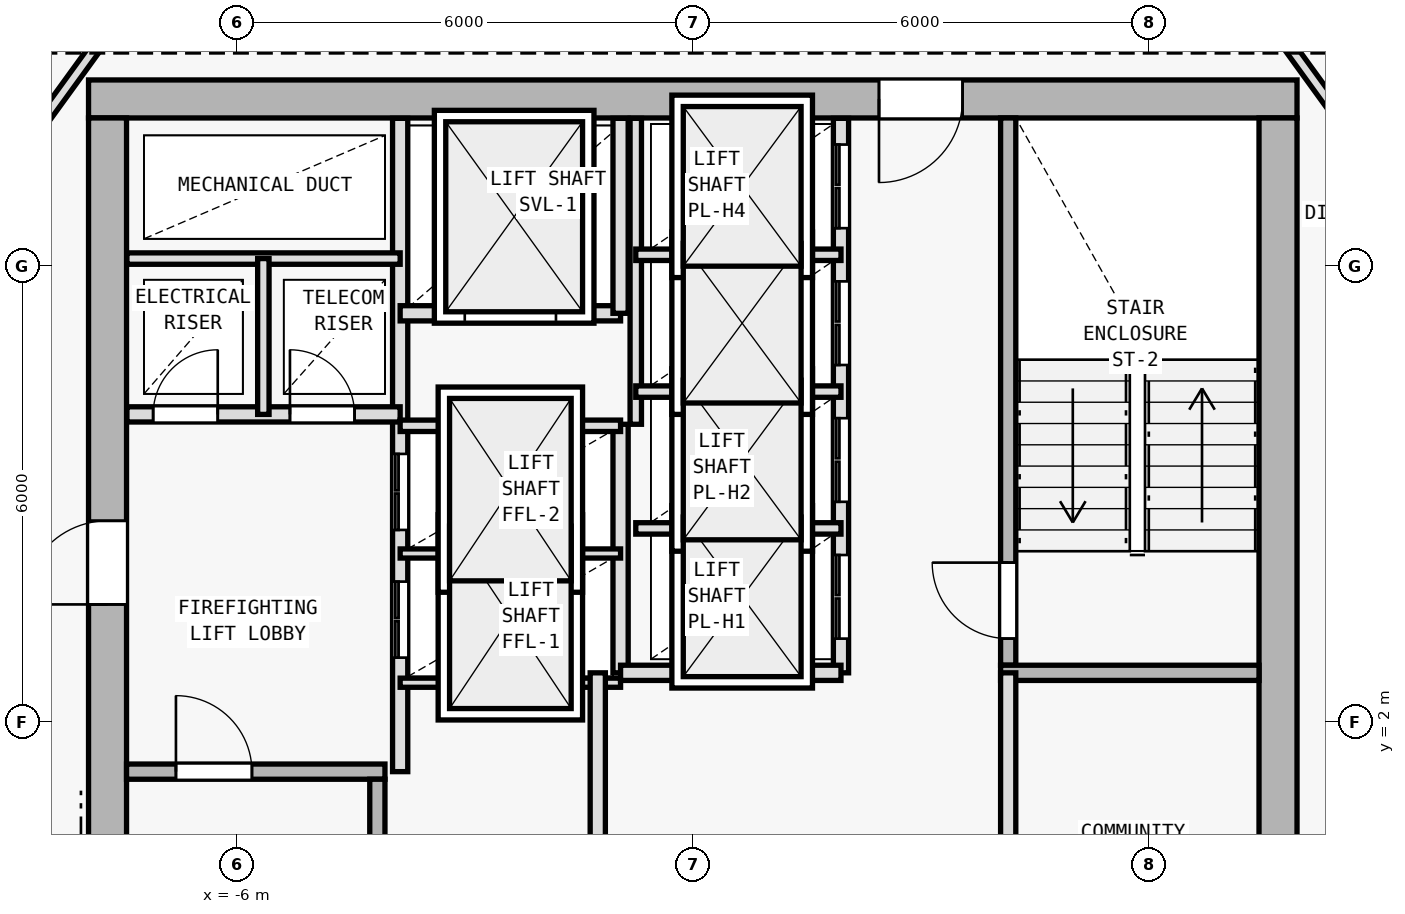
"""IFC4 building model, lengths in metres.
Left out: names, types, materials, properties, quantities, classifications, styles, units other than length and angle.
Written with IfcOpenShell. Run it as: python <this file> out.ifc"""

import sys

from ifc_helpers import new_model, si_unit, direction, frame, frame_2d, origin, origin_2d, place, context, subcontext, project, spatial, rectangle, i_section, extrude, element, fill, save


model = new_model("IFC4")
c1 = context("Model", 3, precision=1e-05, world=origin(), true_north=direction((0.0, 1.0)))
c2 = subcontext(c1, "Body", "Model", "MODEL_VIEW")
j1 = project(units=[si_unit("LENGTHUNIT", "METRE"), si_unit("PLANEANGLEUNIT", "RADIAN")], contexts=[c1])
p1 = place(None, origin())
s1 = spatial("IfcSite", under=j1, at=p1, CompositionType="ELEMENT")
p2 = place(p1, origin())
s2 = spatial("IfcBuilding", under=s1, at=p2, CompositionType="ELEMENT")
p3 = place(p2, frame((0.0, 0.0, 261.6)))
s3 = spatial("IfcBuildingStorey", under=s2, at=p3, CompositionType="ELEMENT", Elevation=261.6)
for number, where, z_axis, x_axis in (
    (1, (7.7, 10.2, 0.0), (0.0, 0.0, 1.0), (1.0, 0.0, 0.0)),
    (2, (-7.7, 10.2, 0.0), (0.0, 0.0, 1.0), (1.0, 0.0, 0.0)),
    (3, (7.7, 0.4, 0.0), (0.0, 0.0, 1.0), (1.0, 0.0, 0.0)),
    (4, (-7.7, 2.0, 0.0), (0.0, 0.0, 1.0), (1.0, 0.0, 0.0)),
):
    element("IfcColumn", number, at=place(p3, frame(where, z_axis=z_axis, x_axis=x_axis)), inside=s3, PredefinedType="COLUMN", context=c2, shape_type="SweptSolid", body=[
        extrude(i_section(OverallWidth=0.374, OverallDepth=0.372, WebThickness=0.012, FlangeThickness=0.02, FilletRadius=0.015, at=origin_2d()), origin(), (0.0, 0.0, 1.0), 3.6),
    ])
p4 = place(p3, frame((7.95, 10.2, 0.0), z_axis=(0.0, 0.0, 1.0), x_axis=(-1.0, 0.0, 0.0)))
e5 = element("IfcWall", 5, at=p4, inside=s3, PredefinedType="SHEAR", context=c2, shape_type="SweptSolid", body=[
    extrude(rectangle(XDim=15.9, YDim=0.5, at=frame_2d((7.95, 0.0))), origin(), (0.0, 0.0, 1.0), 3.35),
])
p5 = place(p4, frame((4.4, 0.0, 0.0)))
e6 = element("IfcOpeningElement", 6, at=p5, cuts=e5, PredefinedType="OPENING", context=c2, shape_type="SweptSolid", body=[
    extrude(rectangle(XDim=1.1, YDim=2.15, at=frame_2d((0.55, 1.075))), frame((0.0, 0.26, 0.0), z_axis=(0.0, -1.0, 0.0), x_axis=(1.0, 0.0, 0.0)), (0.0, 0.0, 1.0), 0.52),
])
p6 = place(p3, frame((-7.7, -9.15, 0.0), z_axis=(0.0, 0.0, 1.0), x_axis=(0.0, 1.0, 0.0)))
e7 = element("IfcWall", 7, at=p6, inside=s3, PredefinedType="SHEAR", context=c2, shape_type="SweptSolid", body=[
    extrude(rectangle(XDim=19.1, YDim=0.5, at=frame_2d((9.55, 0.0))), origin(), (0.0, 0.0, 1.0), 3.35),
])
p7 = place(p6, frame((12.7, 0.0, 0.0)))
e8 = element("IfcOpeningElement", 8, at=p7, cuts=e7, PredefinedType="OPENING", context=c2, shape_type="SweptSolid", body=[
    extrude(rectangle(XDim=1.1, YDim=2.15, at=frame_2d((0.55, 1.075))), frame((0.0, 0.26, 0.0), z_axis=(0.0, -1.0, 0.0), x_axis=(1.0, 0.0, 0.0)), (0.0, 0.0, 1.0), 0.52),
])
p8 = place(p3, frame((7.7, 9.95, 0.0), z_axis=(0.0, 0.0, 1.0), x_axis=(0.0, -1.0, 0.0)))
e9 = element("IfcWall", 9, at=p8, inside=s3, PredefinedType="SHEAR", context=c2, shape_type="SweptSolid", body=[
    extrude(rectangle(XDim=19.1, YDim=0.5, at=frame_2d((9.55, 0.0))), origin(), (0.0, 0.0, 1.0), 3.35),
])
p9 = place(p3, frame((-7.45, 1.35, 0.0), z_axis=(0.0, 0.0, 1.0), x_axis=(1.0, 0.0, 0.0)))
e10 = element("IfcWall", 10, at=p9, inside=s3, PredefinedType="SOLIDWALL", context=c2, shape_type="SweptSolid", body=[
    extrude(rectangle(XDim=3.4, YDim=0.2, at=frame_2d((1.7, 0.0))), origin(), (0.0, 0.0, 1.0), 3.35),
])
p10 = place(p9, frame((0.65, 0.0, 0.0)))
e11 = element("IfcOpeningElement", 11, at=p10, cuts=e10, PredefinedType="OPENING", context=c2, shape_type="SweptSolid", body=[
    extrude(rectangle(XDim=1.0, YDim=2.15, at=frame_2d((0.5, 1.075))), frame((0.0, 0.11, 0.0), z_axis=(0.0, -1.0, 0.0), x_axis=(1.0, 0.0, 0.0)), (0.0, 0.0, 1.0), 0.22),
])
p11 = place(p3, frame((-4.15, -5.95, 0.0), z_axis=(0.0, 0.0, 1.0), x_axis=(0.0, 1.0, 0.0)))
e12 = element("IfcWall", 12, at=p11, inside=s3, PredefinedType="SOLIDWALL", context=c2, shape_type="SweptSolid", body=[
    extrude(rectangle(XDim=7.2, YDim=0.2, at=frame_2d((3.6, 0.0))), origin(), (0.0, 0.0, 1.0), 3.35),
])
p12 = place(p3, frame((-3.85, 1.35, 0.0), z_axis=(0.0, 0.0, 1.0), x_axis=(0.0, 1.0, 0.0)))
e13 = element("IfcWall", 13, at=p12, inside=s3, PredefinedType="SOLIDWALL", context=c2, shape_type="SweptSolid", body=[
    extrude(rectangle(XDim=8.595, YDim=0.2, at=frame_2d((4.297, 0.0))), origin(), (0.0, 0.0, 1.0), 3.35),
])
p13 = place(p12, frame((1.5, 0.0, 0.0)))
e14 = element("IfcOpeningElement", 14, at=p13, cuts=e13, PredefinedType="OPENING", context=c2, shape_type="SweptSolid", body=[
    extrude(rectangle(XDim=1.0, YDim=2.15, at=frame_2d((0.5, 1.075))), frame((0.0, 0.11, 0.0), z_axis=(0.0, -1.0, 0.0), x_axis=(1.0, 0.0, 0.0)), (0.0, 0.0, 1.0), 0.22),
])
p14 = place(p12, frame((3.18, 0.0, 0.0)))
e15 = element("IfcOpeningElement", 15, at=p14, cuts=e13, PredefinedType="OPENING", context=c2, shape_type="SweptSolid", body=[
    extrude(rectangle(XDim=1.0, YDim=2.15, at=frame_2d((0.5, 1.075))), frame((0.0, 0.11, 0.0), z_axis=(0.0, -1.0, 0.0), x_axis=(1.0, 0.0, 0.0)), (0.0, 0.0, 1.0), 0.22),
])
p15 = place(p3, frame((-7.445, 6.05, 0.0), z_axis=(0.0, 0.0, 1.0), x_axis=(1.0, 0.0, 0.0)))
e16 = element("IfcWall", 16, at=p15, inside=s3, PredefinedType="SOLIDWALL", context=c2, shape_type="SweptSolid", body=[
    extrude(rectangle(XDim=3.595, YDim=0.2, at=frame_2d((1.797, 0.0))), origin(), (0.0, 0.0, 1.0), 3.35),
])
p16 = place(p15, frame((0.345, 0.0, 0.0)))
e17 = element("IfcOpeningElement", 17, at=p16, cuts=e16, PredefinedType="OPENING", context=c2, shape_type="SweptSolid", body=[
    extrude(rectangle(XDim=0.85, YDim=2.1, at=frame_2d((0.425, 1.05))), frame((0.0, 0.11, 0.0), z_axis=(0.0, -1.0, 0.0), x_axis=(1.0, 0.0, 0.0)), (0.0, 0.0, 1.0), 0.22),
])
p17 = place(p15, frame((2.145, 0.0, 0.0)))
e18 = element("IfcOpeningElement", 18, at=p17, cuts=e16, PredefinedType="OPENING", context=c2, shape_type="SweptSolid", body=[
    extrude(rectangle(XDim=0.85, YDim=2.1, at=frame_2d((0.425, 1.05))), frame((0.0, 0.11, 0.0), z_axis=(0.0, -1.0, 0.0), x_axis=(1.0, 0.0, 0.0)), (0.0, 0.0, 1.0), 0.22),
])
p18 = place(p3, frame((-7.445, 8.1, 0.0), z_axis=(0.0, 0.0, 1.0), x_axis=(1.0, 0.0, 0.0)))
e19 = element("IfcWall", 19, at=p18, inside=s3, PredefinedType="PARTITIONING", context=c2, shape_type="SweptSolid", body=[
    extrude(rectangle(XDim=3.595, YDim=0.15, at=frame_2d((1.797, 0.0))), origin(), (0.0, 0.0, 1.0), 3.35),
])
p19 = place(p3, frame((-5.65, 6.05, 0.0), z_axis=(0.0, 0.0, 1.0), x_axis=(0.0, 1.0, 0.0)))
e20 = element("IfcWall", 20, at=p19, inside=s3, PredefinedType="PARTITIONING", context=c2, shape_type="SweptSolid", body=[
    extrude(rectangle(XDim=2.05, YDim=0.15, at=frame_2d((1.025, 0.0))), origin(), (0.0, 0.0, 1.0), 3.35),
])
p20 = place(p3, frame((4.15, 2.75, 0.0), z_axis=(0.0, 0.0, 1.0), x_axis=(0.0, 1.0, 0.0)))
e21 = element("IfcWall", 21, at=p20, inside=s3, PredefinedType="SOLIDWALL", context=c2, shape_type="SweptSolid", body=[
    extrude(rectangle(XDim=7.2, YDim=0.2, at=frame_2d((3.6, 0.0))), origin(), (0.0, 0.0, 1.0), 3.35),
])
p21 = place(p20, frame((0.35, 0.0, 0.0)))
e22 = element("IfcOpeningElement", 22, at=p21, cuts=e21, PredefinedType="OPENING", context=c2, shape_type="SweptSolid", body=[
    extrude(rectangle(XDim=1.0, YDim=2.15, at=frame_2d((0.5, 1.075))), frame((0.0, 0.11, 0.0), z_axis=(0.0, -1.0, 0.0), x_axis=(1.0, 0.0, 0.0)), (0.0, 0.0, 1.0), 0.22),
])
p22 = place(p3, frame((4.05, 2.65, 0.0), z_axis=(0.0, 0.0, 1.0), x_axis=(1.0, 0.0, 0.0)))
e23 = element("IfcWall", 23, at=p22, inside=s3, PredefinedType="SOLIDWALL", context=c2, shape_type="SweptSolid", body=[
    extrude(rectangle(XDim=3.4, YDim=0.2, at=frame_2d((1.7, 0.0))), origin(), (0.0, 0.0, 1.0), 3.35),
])
p23 = place(p3, frame((-0.95, 2.65, 0.0), z_axis=(0.0, 0.0, 1.0), x_axis=(0.0, 1.0, 0.0)))
e24 = element("IfcWall", 24, at=p23, inside=s3, PredefinedType="SOLIDWALL", context=c2, shape_type="SweptSolid", body=[
    extrude(rectangle(XDim=3.27, YDim=0.2, at=frame_2d((1.635, 0.0))), origin(), (0.0, 0.0, 1.0), 3.35),
])
for number, where, z_axis, x_axis in (
    (25, (-3.85, 2.52, 0.0), (0.0, 0.0, 1.0), (1.0, 0.0, 0.0)),
    (26, (-3.85, 4.22, 0.0), (0.0, 0.0, 1.0), (1.0, 0.0, 0.0)),
):
    element("IfcWall", number, at=place(p3, frame(where, z_axis=z_axis, x_axis=x_axis)), inside=s3, PredefinedType="PARTITIONING", context=c2, shape_type="SweptSolid", body=[
        extrude(rectangle(XDim=2.9, YDim=0.12, at=frame_2d((1.45, 0.0))), origin(), (0.0, 0.0, 1.0), 3.35),
    ])
p24 = place(p3, frame((-3.85, 5.9, 0.0), z_axis=(0.0, 0.0, 1.0), x_axis=(1.0, 0.0, 0.0)))
e27 = element("IfcWall", 27, at=p24, inside=s3, PredefinedType="PARTITIONING", context=c2, shape_type="SweptSolid", body=[
    extrude(rectangle(XDim=2.9, YDim=0.15, at=frame_2d((1.45, 0.0))), origin(), (0.0, 0.0, 1.0), 3.35),
])
p25 = place(p3, frame((-3.85, 7.38, 0.0), z_axis=(0.0, 0.0, 1.0), x_axis=(1.0, 0.0, 0.0)))
e28 = element("IfcWall", 28, at=p25, inside=s3, PredefinedType="SOLIDWALL", context=c2, shape_type="SweptSolid", body=[
    extrude(rectangle(XDim=2.9, YDim=0.2, at=frame_2d((1.45, 0.0))), origin(), (0.0, 0.0, 1.0), 3.35),
])
p26 = place(p25, frame((0.85, 0.0, 0.0)))
e29 = element("IfcOpeningElement", 29, at=p26, cuts=e28, PredefinedType="OPENING", context=c2, shape_type="SweptSolid", body=[
    extrude(rectangle(XDim=1.2, YDim=2.2, at=frame_2d((0.6, 1.1))), frame((0.0, 0.11, 0.0), z_axis=(0.0, -1.0, 0.0), x_axis=(1.0, 0.0, 0.0)), (0.0, 0.0, 1.0), 0.22),
])
p27 = place(p3, frame((-0.95, 7.38, 0.0), z_axis=(0.0, 0.0, 1.0), x_axis=(0.0, 1.0, 0.0)))
e30 = element("IfcWall", 30, at=p27, inside=s3, PredefinedType="SOLIDWALL", context=c2, shape_type="SweptSolid", body=[
    extrude(rectangle(XDim=2.565, YDim=0.2, at=frame_2d((1.283, 0.0))), origin(), (0.0, 0.0, 1.0), 3.35),
])
p28 = place(p3, frame((4.15, -6.05, 0.0), z_axis=(0.0, 0.0, 1.0), x_axis=(0.0, 1.0, 0.0)))
e31 = element("IfcWall", 31, at=p28, inside=s3, PredefinedType="SOLIDWALL", context=c2, shape_type="SweptSolid", body=[
    extrude(rectangle(XDim=8.7, YDim=0.2, at=frame_2d((4.35, 0.0))), origin(), (0.0, 0.0, 1.0), 3.35),
])
p29 = place(p28, frame((3.6, 0.0, 0.0)))
e32 = element("IfcOpeningElement", 32, at=p29, cuts=e31, PredefinedType="OPENING", context=c2, shape_type="SweptSolid", body=[
    extrude(rectangle(XDim=0.95, YDim=2.1, at=frame_2d((0.475, 1.05))), frame((0.0, 0.11, 0.0), z_axis=(0.0, -1.0, 0.0), x_axis=(1.0, 0.0, 0.0)), (0.0, 0.0, 1.0), 0.22),
])
p30 = place(p3, frame((-1.25, -6.05, 0.0), z_axis=(0.0, 0.0, 1.0), x_axis=(0.0, 1.0, 0.0)))
e33 = element("IfcWall", 33, at=p30, inside=s3, PredefinedType="SOLIDWALL", context=c2, shape_type="SweptSolid", body=[
    extrude(rectangle(XDim=8.7, YDim=0.2, at=frame_2d((4.35, 0.0))), origin(), (0.0, 0.0, 1.0), 3.35),
])
p31 = place(p30, frame((3.4, 0.0, 0.0)))
e34 = element("IfcOpeningElement", 34, at=p31, cuts=e33, PredefinedType="OPENING", context=c2, shape_type="SweptSolid", body=[
    extrude(rectangle(XDim=0.95, YDim=2.1, at=frame_2d((0.475, 1.05))), frame((0.0, 0.11, 0.0), z_axis=(0.0, -1.0, 0.0), x_axis=(1.0, 0.0, 0.0)), (0.0, 0.0, 1.0), 0.22),
])
p32 = place(p3, frame((1.95, 2.65, 0.0), z_axis=(0.0, 0.0, 1.0), x_axis=(0.0, 1.0, 0.0)))
e35 = element("IfcWall", 35, at=p32, inside=s3, PredefinedType="SOLIDWALL", context=c2, shape_type="SweptSolid", body=[
    extrude(rectangle(XDim=7.295, YDim=0.2, at=frame_2d((3.647, 0.0))), origin(), (0.0, 0.0, 1.0), 3.35),
])
p33 = place(p32, frame((0.45, 0.0, 0.0)))
e36 = element("IfcOpeningElement", 36, at=p33, cuts=e35, PredefinedType="OPENING", context=c2, shape_type="SweptSolid", body=[
    extrude(rectangle(XDim=1.1, YDim=2.15, at=frame_2d((0.55, 1.075))), frame((0.0, 0.11, 0.0), z_axis=(0.0, -1.0, 0.0), x_axis=(1.0, 0.0, 0.0)), (0.0, 0.0, 1.0), 0.22),
])
p34 = place(p32, frame((2.25, 0.0, 0.0)))
e37 = element("IfcOpeningElement", 37, at=p34, cuts=e35, PredefinedType="OPENING", context=c2, shape_type="SweptSolid", body=[
    extrude(rectangle(XDim=1.1, YDim=2.15, at=frame_2d((0.55, 1.075))), frame((0.0, 0.11, 0.0), z_axis=(0.0, -1.0, 0.0), x_axis=(1.0, 0.0, 0.0)), (0.0, 0.0, 1.0), 0.22),
])
p35 = place(p32, frame((4.05, 0.0, 0.0)))
e38 = element("IfcOpeningElement", 38, at=p35, cuts=e35, PredefinedType="OPENING", context=c2, shape_type="SweptSolid", body=[
    extrude(rectangle(XDim=1.1, YDim=2.15, at=frame_2d((0.55, 1.075))), frame((0.0, 0.11, 0.0), z_axis=(0.0, -1.0, 0.0), x_axis=(1.0, 0.0, 0.0)), (0.0, 0.0, 1.0), 0.22),
])
p36 = place(p32, frame((5.85, 0.0, 0.0)))
e39 = element("IfcOpeningElement", 39, at=p36, cuts=e35, PredefinedType="OPENING", context=c2, shape_type="SweptSolid", body=[
    extrude(rectangle(XDim=1.1, YDim=2.15, at=frame_2d((0.55, 1.075))), frame((0.0, 0.11, 0.0), z_axis=(0.0, -1.0, 0.0), x_axis=(1.0, 0.0, 0.0)), (0.0, 0.0, 1.0), 0.22),
])
p37 = place(p3, frame((-0.95, 2.65, 0.0), z_axis=(0.0, 0.0, 1.0), x_axis=(1.0, 0.0, 0.0)))
e40 = element("IfcWall", 40, at=p37, inside=s3, PredefinedType="SOLIDWALL", context=c2, shape_type="SweptSolid", body=[
    extrude(rectangle(XDim=2.9, YDim=0.2, at=frame_2d((1.45, 0.0))), origin(), (0.0, 0.0, 1.0), 3.35),
])
p38 = place(p3, frame((-0.75, 5.92, 0.0), z_axis=(0.0, 0.0, 1.0), x_axis=(0.0, 1.0, 0.0)))
e41 = element("IfcWall", 41, at=p38, inside=s3, PredefinedType="PARTITIONING", context=c2, shape_type="SweptSolid", body=[
    extrude(rectangle(XDim=4.025, YDim=0.15, at=frame_2d((2.013, 0.0))), origin(), (0.0, 0.0, 1.0), 3.35),
])
for number, where, z_axis, x_axis in (
    (42, (-0.75, 4.55, 0.0), (0.0, 0.0, 1.0), (1.0, 0.0, 0.0)),
    (43, (-0.75, 6.35, 0.0), (0.0, 0.0, 1.0), (1.0, 0.0, 0.0)),
    (44, (-0.75, 8.15, 0.0), (0.0, 0.0, 1.0), (1.0, 0.0, 0.0)),
):
    element("IfcWall", number, at=place(p3, frame(where, z_axis=z_axis, x_axis=x_axis)), inside=s3, PredefinedType="PARTITIONING", context=c2, shape_type="SweptSolid", body=[
        extrude(rectangle(XDim=2.7, YDim=0.15, at=frame_2d((1.35, 0.0))), origin(), (0.0, 0.0, 1.0), 3.35),
    ])
p39 = place(p3, frame((-9.78, 8.226, 0.0), z_axis=(0.0, 0.0, 1.0), x_axis=(0.586956386413, 0.809618552436, 0.0)))
e45 = element("IfcWall", 45, at=p39, inside=s3, PredefinedType="PARTITIONING", context=c2, shape_type="SweptSolid", body=[
    extrude(rectangle(XDim=5.008, YDim=0.15, at=frame_2d((2.504, 0.0))), origin(), (0.0, 0.0, 1.0), 2.995),
])
p40 = place(p3, frame((6.841, 12.28, 0.0), z_axis=(0.0, 0.0, 1.0), x_axis=(0.586956386413, -0.809618552436, 0.0)))
e46 = element("IfcWall", 46, at=p40, inside=s3, PredefinedType="PARTITIONING", context=c2, shape_type="SweptSolid", body=[
    extrude(rectangle(XDim=5.008, YDim=0.15, at=frame_2d((2.504, 0.0))), origin(), (0.0, 0.0, 1.0), 2.925),
])
p41 = place(p40, frame((2.954, 0.0, 0.0)))
e47 = element("IfcOpeningElement", 47, at=p41, cuts=e46, PredefinedType="OPENING", context=c2, shape_type="SweptSolid", body=[
    extrude(rectangle(XDim=0.9, YDim=2.1, at=frame_2d((0.45, 1.05))), frame((0.0, 0.085, 0.0), z_axis=(0.0, -1.0, 0.0), x_axis=(1.0, 0.0, 0.0)), (0.0, 0.0, 1.0), 0.17),
])
p42 = place(p7, origin())
e48 = element("IfcDoor", 48, at=p42, inside=s3, OperationType="SINGLE_SWING_LEFT", PredefinedType="DOOR", context=c2, shape_type="SweptSolid", body=[
    extrude(rectangle(XDim=1.1, YDim=2.15, at=frame_2d((0.55, 1.075))), frame((0.0, 0.025, 0.0), z_axis=(0.0, -1.0, 0.0), x_axis=(1.0, 0.0, 0.0)), (0.0, 0.0, 1.0), 0.05),
])
fill(e8, e48)
p43 = place(p5, origin())
e49 = element("IfcDoor", 49, at=p43, inside=s3, OperationType="SINGLE_SWING_RIGHT", PredefinedType="DOOR", context=c2, shape_type="SweptSolid", body=[
    extrude(rectangle(XDim=1.1, YDim=2.15, at=frame_2d((0.55, 1.075))), frame((0.0, 0.025, 0.0), z_axis=(0.0, -1.0, 0.0), x_axis=(1.0, 0.0, 0.0)), (0.0, 0.0, 1.0), 0.05),
])
fill(e6, e49)
p44 = place(p10, origin())
e50 = element("IfcDoor", 50, at=p44, inside=s3, OperationType="SINGLE_SWING_LEFT", PredefinedType="DOOR", context=c2, shape_type="SweptSolid", body=[
    extrude(rectangle(XDim=1.0, YDim=2.15, at=frame_2d((0.5, 1.075))), frame((0.0, 0.025, 0.0), z_axis=(0.0, -1.0, 0.0), x_axis=(1.0, 0.0, 0.0)), (0.0, 0.0, 1.0), 0.05),
])
fill(e11, e50)
p45 = place(p16, origin())
e51 = element("IfcDoor", 51, at=p45, inside=s3, OperationType="SINGLE_SWING_RIGHT", PredefinedType="DOOR", context=c2, shape_type="SweptSolid", body=[
    extrude(rectangle(XDim=0.85, YDim=2.1, at=frame_2d((0.425, 1.05))), frame((0.0, 0.025, 0.0), z_axis=(0.0, -1.0, 0.0), x_axis=(1.0, 0.0, 0.0)), (0.0, 0.0, 1.0), 0.05),
])
fill(e17, e51)
p46 = place(p17, origin())
e52 = element("IfcDoor", 52, at=p46, inside=s3, OperationType="SINGLE_SWING_LEFT", PredefinedType="DOOR", context=c2, shape_type="SweptSolid", body=[
    extrude(rectangle(XDim=0.85, YDim=2.1, at=frame_2d((0.425, 1.05))), frame((0.0, 0.025, 0.0), z_axis=(0.0, -1.0, 0.0), x_axis=(1.0, 0.0, 0.0)), (0.0, 0.0, 1.0), 0.05),
])
fill(e18, e52)
p47 = place(p21, origin())
e53 = element("IfcDoor", 53, at=p47, inside=s3, OperationType="SINGLE_SWING_RIGHT", PredefinedType="DOOR", context=c2, shape_type="SweptSolid", body=[
    extrude(rectangle(XDim=1.0, YDim=2.15, at=frame_2d((0.5, 1.075))), frame((0.0, 0.025, 0.0), z_axis=(0.0, -1.0, 0.0), x_axis=(1.0, 0.0, 0.0)), (0.0, 0.0, 1.0), 0.05),
])
fill(e22, e53)
p48 = place(p26, origin())
e54 = element("IfcDoor", 54, at=p48, inside=s3, OperationType="DOUBLE_DOOR_SLIDING", PredefinedType="DOOR", context=c2, shape_type="SweptSolid", body=[
    extrude(rectangle(XDim=1.2, YDim=2.2, at=frame_2d((0.6, 1.1))), frame((0.0, 0.025, 0.0), z_axis=(0.0, -1.0, 0.0), x_axis=(1.0, 0.0, 0.0)), (0.0, 0.0, 1.0), 0.05),
])
fill(e29, e54)
p49 = place(p33, origin())
e55 = element("IfcDoor", 55, at=p49, inside=s3, OperationType="DOUBLE_DOOR_SLIDING", PredefinedType="DOOR", context=c2, shape_type="SweptSolid", body=[
    extrude(rectangle(XDim=1.1, YDim=2.15, at=frame_2d((0.55, 1.075))), frame((0.0, 0.025, 0.0), z_axis=(0.0, -1.0, 0.0), x_axis=(1.0, 0.0, 0.0)), (0.0, 0.0, 1.0), 0.05),
])
fill(e36, e55)
p50 = place(p34, origin())
e56 = element("IfcDoor", 56, at=p50, inside=s3, OperationType="DOUBLE_DOOR_SLIDING", PredefinedType="DOOR", context=c2, shape_type="SweptSolid", body=[
    extrude(rectangle(XDim=1.1, YDim=2.15, at=frame_2d((0.55, 1.075))), frame((0.0, 0.025, 0.0), z_axis=(0.0, -1.0, 0.0), x_axis=(1.0, 0.0, 0.0)), (0.0, 0.0, 1.0), 0.05),
])
fill(e37, e56)
p51 = place(p35, origin())
e57 = element("IfcDoor", 57, at=p51, inside=s3, OperationType="DOUBLE_DOOR_SLIDING", PredefinedType="DOOR", context=c2, shape_type="SweptSolid", body=[
    extrude(rectangle(XDim=1.1, YDim=2.15, at=frame_2d((0.55, 1.075))), frame((0.0, 0.025, 0.0), z_axis=(0.0, -1.0, 0.0), x_axis=(1.0, 0.0, 0.0)), (0.0, 0.0, 1.0), 0.05),
])
fill(e38, e57)
p52 = place(p36, origin())
e58 = element("IfcDoor", 58, at=p52, inside=s3, OperationType="DOUBLE_DOOR_SLIDING", PredefinedType="DOOR", context=c2, shape_type="SweptSolid", body=[
    extrude(rectangle(XDim=1.1, YDim=2.15, at=frame_2d((0.55, 1.075))), frame((0.0, 0.025, 0.0), z_axis=(0.0, -1.0, 0.0), x_axis=(1.0, 0.0, 0.0)), (0.0, 0.0, 1.0), 0.05),
])
fill(e39, e58)
p53 = place(p13, origin())
e59 = element("IfcDoor", 59, at=p53, inside=s3, OperationType="DOUBLE_DOOR_SLIDING", PredefinedType="DOOR", context=c2, shape_type="SweptSolid", body=[
    extrude(rectangle(XDim=1.0, YDim=2.15, at=frame_2d((0.5, 1.075))), frame((0.0, 0.025, 0.0), z_axis=(0.0, -1.0, 0.0), x_axis=(1.0, 0.0, 0.0)), (0.0, 0.0, 1.0), 0.05),
])
fill(e14, e59)
p54 = place(p14, origin())
e60 = element("IfcDoor", 60, at=p54, inside=s3, OperationType="DOUBLE_DOOR_SLIDING", PredefinedType="DOOR", context=c2, shape_type="SweptSolid", body=[
    extrude(rectangle(XDim=1.0, YDim=2.15, at=frame_2d((0.5, 1.075))), frame((0.0, 0.025, 0.0), z_axis=(0.0, -1.0, 0.0), x_axis=(1.0, 0.0, 0.0)), (0.0, 0.0, 1.0), 0.05),
])
fill(e15, e60)
save(model, sys.argv[1])
